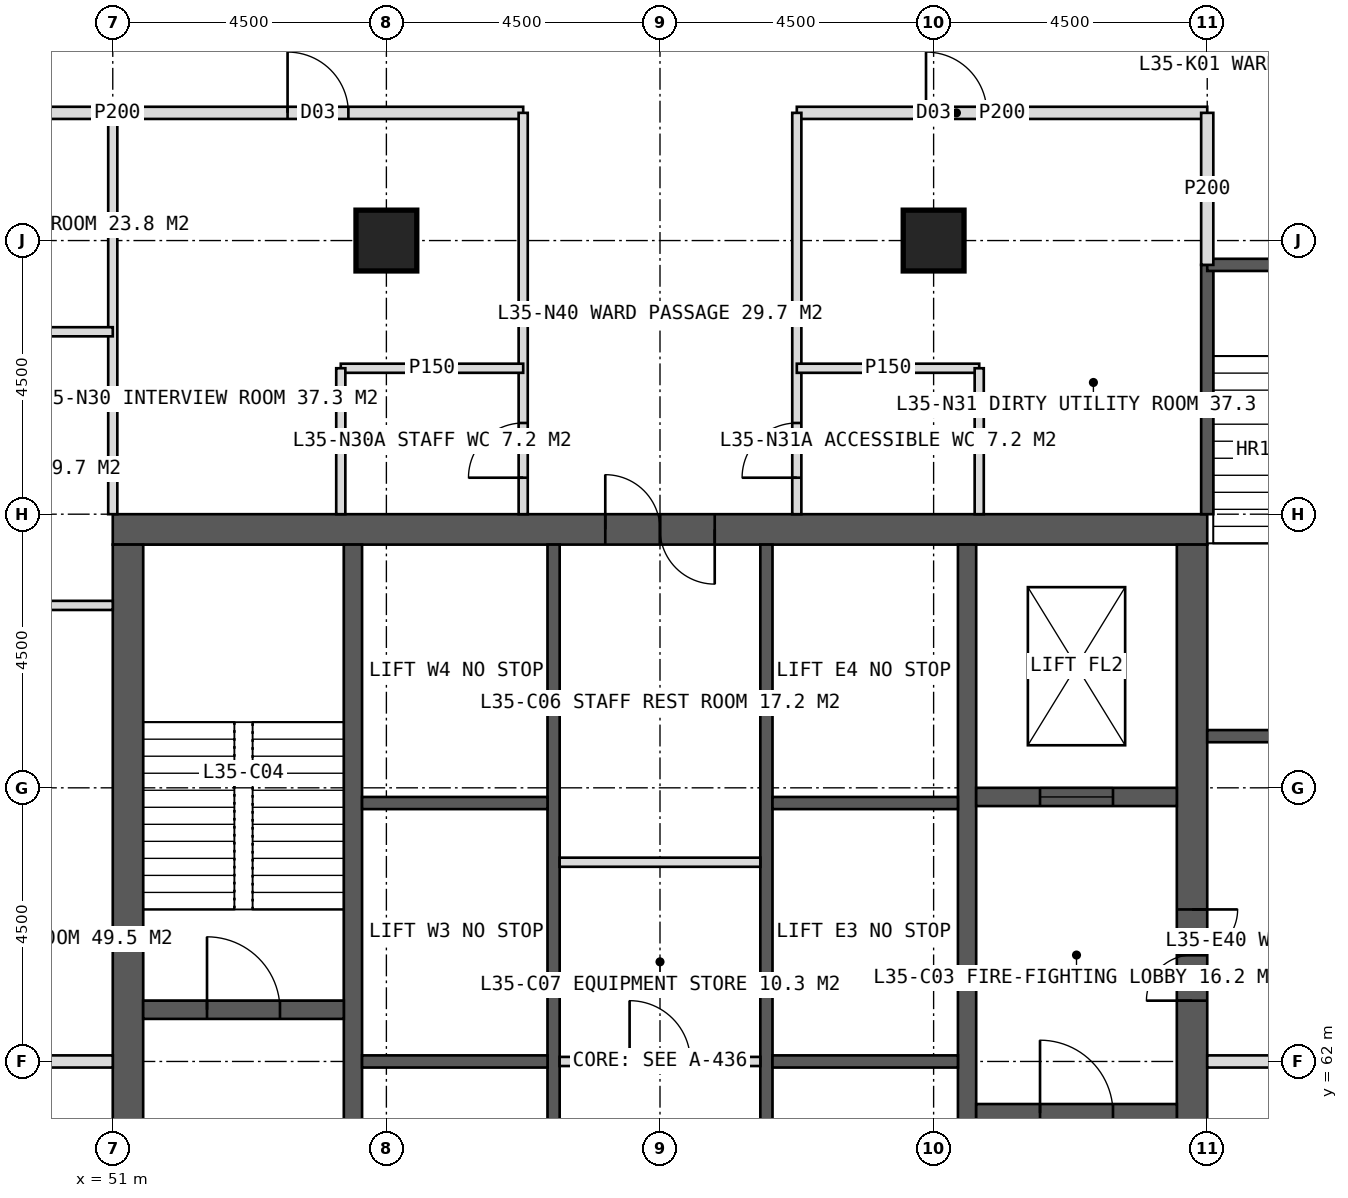
"""IFC4 building model, lengths in metres.
Left out: names, types, materials, properties, quantities, classifications, styles, units other than length and angle.
Written with IfcOpenShell. Run it as: python <this file> out.ifc"""

import sys

from ifc_helpers import new_model, si_unit, direction, frame, frame_2d, origin, origin_2d, place, context, subcontext, project, spatial, rectangle, hollow_rectangle, extrude, element, fill, save


model = new_model("IFC4")
c1 = context("Model", 3, precision=1e-05, world=origin(), true_north=direction((0.0, 1.0)))
c2 = subcontext(c1, "Body", "Model", "MODEL_VIEW")
j1 = project(units=[si_unit("LENGTHUNIT", "METRE"), si_unit("PLANEANGLEUNIT", "RADIAN")], contexts=[c1])
p1 = place(None, origin())
s1 = spatial("IfcSite", under=j1, at=p1, CompositionType="ELEMENT")
p2 = place(p1, origin())
s2 = spatial("IfcBuilding", under=s1, at=p2, CompositionType="ELEMENT")
p3 = place(p2, frame((0.0, 0.0, 148.0)))
s3 = spatial("IfcBuildingStorey", under=s2, at=p3, CompositionType="ELEMENT", Elevation=148.0)
p4 = place(p3, frame((51.0, 70.75, 0.0), z_axis=(0.0, 0.0, 1.0), x_axis=(1.0, 0.0, 0.0)))
e1 = element("IfcWall", 1, at=p4, inside=s3, PredefinedType="SHEAR", context=c2, shape_type="SweptSolid", body=[
    extrude(rectangle(XDim=18.0, YDim=0.5, at=frame_2d((9.0, 0.0))), origin(), (0.0, 0.0, 1.0), 4.0),
])
p5 = place(p4, frame((8.1, 0.0, 0.0)))
e2 = element("IfcOpeningElement", 2, at=p5, cuts=e1, PredefinedType="OPENING", context=c2, shape_type="SweptSolid", body=[
    extrude(rectangle(XDim=1.8, YDim=2.2, at=frame_2d((0.9, 1.1))), frame((0.0, 0.26, 0.0), z_axis=(0.0, -1.0, 0.0), x_axis=(1.0, 0.0, 0.0)), (0.0, 0.0, 1.0), 0.52),
])
p6 = place(p3, frame((51.25, 53.5, 0.0), z_axis=(0.0, 0.0, 1.0), x_axis=(0.0, 1.0, 0.0)))
e3 = element("IfcWall", 3, at=p6, inside=s3, PredefinedType="SHEAR", context=c2, shape_type="SweptSolid", body=[
    extrude(rectangle(XDim=17.0, YDim=0.5, at=frame_2d((8.5, 0.0))), origin(), (0.0, 0.0, 1.0), 4.0),
])
p7 = place(p6, frame((6.0, 0.0, 0.0)))
e4 = element("IfcOpeningElement", 4, at=p7, cuts=e3, PredefinedType="OPENING", context=c2, shape_type="SweptSolid", body=[
    extrude(rectangle(XDim=1.5, YDim=2.2, at=frame_2d((0.75, 1.1))), frame((0.0, 0.26, 0.0), z_axis=(0.0, -1.0, 0.0), x_axis=(1.0, 0.0, 0.0)), (0.0, 0.0, 1.0), 0.52),
])
p8 = place(p3, frame((68.75, 53.5, 0.0), z_axis=(0.0, 0.0, 1.0), x_axis=(0.0, 1.0, 0.0)))
e5 = element("IfcWall", 5, at=p8, inside=s3, PredefinedType="SHEAR", context=c2, shape_type="SweptSolid", body=[
    extrude(rectangle(XDim=17.0, YDim=0.5, at=frame_2d((8.5, 0.0))), origin(), (0.0, 0.0, 1.0), 4.0),
])
p9 = place(p8, frame((9.5, 0.0, 0.0)))
e6 = element("IfcOpeningElement", 6, at=p9, cuts=e5, PredefinedType="OPENING", context=c2, shape_type="SweptSolid", body=[
    extrude(rectangle(XDim=1.5, YDim=2.2, at=frame_2d((0.75, 1.1))), frame((0.0, 0.26, 0.0), z_axis=(0.0, -1.0, 0.0), x_axis=(1.0, 0.0, 0.0)), (0.0, 0.0, 1.0), 0.52),
])
for number, where, z_axis, x_axis in (
    (7, (54.95, 53.5, 0.0), (0.0, 0.0, 1.0), (0.0, 1.0, 0.0)),
    (8, (65.05, 53.5, 0.0), (0.0, 0.0, 1.0), (0.0, 1.0, 0.0)),
):
    element("IfcWall", number, at=place(p3, frame(where, z_axis=z_axis, x_axis=x_axis)), inside=s3, PredefinedType="SHEAR", context=c2, shape_type="SweptSolid", body=[
        extrude(rectangle(XDim=17.0, YDim=0.3, at=frame_2d((8.5, 0.0))), origin(), (0.0, 0.0, 1.0), 4.0),
    ])
p10 = place(p3, frame((58.25, 53.5, 0.0), z_axis=(0.0, 0.0, 1.0), x_axis=(0.0, 1.0, 0.0)))
e9 = element("IfcWall", 9, at=p10, inside=s3, PredefinedType="SHEAR", context=c2, shape_type="SweptSolid", body=[
    extrude(rectangle(XDim=17.0, YDim=0.2, at=frame_2d((8.5, 0.0))), origin(), (0.0, 0.0, 1.0), 4.0),
])
p11 = place(p10, frame((1.375, 0.0, 0.0)))
e10 = element("IfcOpeningElement", 10, at=p11, cuts=e9, PredefinedType="OPENING", context=c2, shape_type="SweptSolid", body=[
    extrude(rectangle(XDim=1.4, YDim=2.2, at=frame_2d((0.7, 1.1))), frame((0.0, 0.11, 0.0), z_axis=(0.0, -1.0, 0.0), x_axis=(1.0, 0.0, 0.0)), (0.0, 0.0, 1.0), 0.22),
])
p12 = place(p10, frame((5.675, 0.0, 0.0)))
e11 = element("IfcOpeningElement", 11, at=p12, cuts=e9, PredefinedType="OPENING", context=c2, shape_type="SweptSolid", body=[
    extrude(rectangle(XDim=1.4, YDim=2.2, at=frame_2d((0.7, 1.1))), frame((0.0, 0.11, 0.0), z_axis=(0.0, -1.0, 0.0), x_axis=(1.0, 0.0, 0.0)), (0.0, 0.0, 1.0), 0.22),
])
p13 = place(p3, frame((61.75, 53.5, 0.0), z_axis=(0.0, 0.0, 1.0), x_axis=(0.0, 1.0, 0.0)))
e12 = element("IfcWall", 12, at=p13, inside=s3, PredefinedType="SHEAR", context=c2, shape_type="SweptSolid", body=[
    extrude(rectangle(XDim=17.0, YDim=0.2, at=frame_2d((8.5, 0.0))), origin(), (0.0, 0.0, 1.0), 4.0),
])
p14 = place(p13, frame((1.375, 0.0, 0.0)))
e13 = element("IfcOpeningElement", 13, at=p14, cuts=e12, PredefinedType="OPENING", context=c2, shape_type="SweptSolid", body=[
    extrude(rectangle(XDim=1.4, YDim=2.2, at=frame_2d((0.7, 1.1))), frame((0.0, 0.11, 0.0), z_axis=(0.0, -1.0, 0.0), x_axis=(1.0, 0.0, 0.0)), (0.0, 0.0, 1.0), 0.22),
])
p15 = place(p13, frame((5.675, 0.0, 0.0)))
e14 = element("IfcOpeningElement", 14, at=p15, cuts=e12, PredefinedType="OPENING", context=c2, shape_type="SweptSolid", body=[
    extrude(rectangle(XDim=1.4, YDim=2.2, at=frame_2d((0.7, 1.1))), frame((0.0, 0.11, 0.0), z_axis=(0.0, -1.0, 0.0), x_axis=(1.0, 0.0, 0.0)), (0.0, 0.0, 1.0), 0.22),
])
for number, where, z_axis, x_axis in (
    (15, (55.1, 62.0, 0.0), (0.0, 0.0, 1.0), (1.0, 0.0, 0.0)),
    (16, (61.85, 62.0, 0.0), (0.0, 0.0, 1.0), (1.0, 0.0, 0.0)),
    (17, (55.1, 66.25, 0.0), (0.0, 0.0, 1.0), (1.0, 0.0, 0.0)),
    (18, (61.85, 66.25, 0.0), (0.0, 0.0, 1.0), (1.0, 0.0, 0.0)),
):
    element("IfcWall", number, at=place(p3, frame(where, z_axis=z_axis, x_axis=x_axis)), inside=s3, PredefinedType="SHEAR", context=c2, shape_type="SweptSolid", body=[
        extrude(rectangle(XDim=3.05, YDim=0.2, at=frame_2d((1.525, 0.0))), origin(), (0.0, 0.0, 1.0), 4.0),
    ])
p16 = place(p3, frame((51.5, 62.85, 0.0), z_axis=(0.0, 0.0, 1.0), x_axis=(1.0, 0.0, 0.0)))
e19 = element("IfcWall", 19, at=p16, inside=s3, PredefinedType="SHEAR", context=c2, shape_type="SweptSolid", body=[
    extrude(rectangle(XDim=3.3, YDim=0.3, at=frame_2d((1.65, 0.0))), origin(), (0.0, 0.0, 1.0), 4.0),
])
p17 = place(p16, frame((1.05, 0.0, 0.0)))
e20 = element("IfcOpeningElement", 20, at=p17, cuts=e19, PredefinedType="OPENING", context=c2, shape_type="SweptSolid", body=[
    extrude(rectangle(XDim=1.2, YDim=2.1, at=frame_2d((0.6, 1.05))), frame((0.0, 0.16, 0.0), z_axis=(0.0, -1.0, 0.0), x_axis=(1.0, 0.0, 0.0)), (0.0, 0.0, 1.0), 0.32),
])
p18 = place(p3, frame((65.2, 61.15, 0.0), z_axis=(0.0, 0.0, 1.0), x_axis=(1.0, 0.0, 0.0)))
e21 = element("IfcWall", 21, at=p18, inside=s3, PredefinedType="SHEAR", context=c2, shape_type="SweptSolid", body=[
    extrude(rectangle(XDim=3.3, YDim=0.3, at=frame_2d((1.65, 0.0))), origin(), (0.0, 0.0, 1.0), 4.0),
])
p19 = place(p18, frame((1.05, 0.0, 0.0)))
e22 = element("IfcOpeningElement", 22, at=p19, cuts=e21, PredefinedType="OPENING", context=c2, shape_type="SweptSolid", body=[
    extrude(rectangle(XDim=1.2, YDim=2.1, at=frame_2d((0.6, 1.05))), frame((0.0, 0.16, 0.0), z_axis=(0.0, -1.0, 0.0), x_axis=(1.0, 0.0, 0.0)), (0.0, 0.0, 1.0), 0.32),
])
p20 = place(p3, frame((65.2, 66.35, 0.0), z_axis=(0.0, 0.0, 1.0), x_axis=(1.0, 0.0, 0.0)))
e23 = element("IfcWall", 23, at=p20, inside=s3, PredefinedType="SHEAR", context=c2, shape_type="SweptSolid", body=[
    extrude(rectangle(XDim=3.3, YDim=0.3, at=frame_2d((1.65, 0.0))), origin(), (0.0, 0.0, 1.0), 4.0),
])
p21 = place(p20, frame((1.05, 0.0, 0.0)))
e24 = element("IfcOpeningElement", 24, at=p21, cuts=e23, PredefinedType="OPENING", context=c2, shape_type="SweptSolid", body=[
    extrude(rectangle(XDim=1.2, YDim=2.2, at=frame_2d((0.6, 1.1))), frame((0.0, 0.16, 0.0), z_axis=(0.0, -1.0, 0.0), x_axis=(1.0, 0.0, 0.0)), (0.0, 0.0, 1.0), 0.32),
])
for number, where, z_axis, x_axis in (
    (25, (55.5, 75.5, 0.0), (0.0, 0.0, 1.0), (1.0, 0.0, 0.0)),
    (26, (64.5, 75.5, 0.0), (0.0, 0.0, 1.0), (1.0, 0.0, 0.0)),
):
    element("IfcColumn", number, at=place(p3, frame(where, z_axis=z_axis, x_axis=x_axis)), inside=s3, PredefinedType="COLUMN", context=c2, shape_type="SweptSolid", body=[
        extrude(hollow_rectangle(XDim=1.0, YDim=1.0, WallThickness=0.1, at=origin_2d()), origin(), (0.0, 0.0, 1.0), 4.0),
    ])
p22 = place(p3, frame((51.0, 71.0, 0.0), z_axis=(0.0, 0.0, 1.0), x_axis=(0.0, 1.0, 0.0)))
e27 = element("IfcWall", 27, at=p22, inside=s3, PredefinedType="PARTITIONING", context=c2, shape_type="SweptSolid", body=[
    extrude(rectangle(XDim=6.6, YDim=0.15, at=frame_2d((3.3, 0.0))), origin(), (0.0, 0.0, 1.0), 3.75),
])
p23 = place(p3, frame((44.4, 77.6, 0.0), z_axis=(0.0, 0.0, 1.0), x_axis=(1.0, 0.0, 0.0)))
e28 = element("IfcWall", 28, at=p23, inside=s3, PredefinedType="PARTITIONING", context=c2, shape_type="SweptSolid", body=[
    extrude(rectangle(XDim=13.35, YDim=0.2, at=frame_2d((6.675, 0.0))), origin(), (0.0, 0.0, 1.0), 3.75),
])
p24 = place(p23, frame((9.475, 0.0, 0.0)))
e29 = element("IfcOpeningElement", 29, at=p24, cuts=e28, PredefinedType="OPENING", context=c2, shape_type="SweptSolid", body=[
    extrude(rectangle(XDim=1.0, YDim=2.1, at=frame_2d((0.5, 1.05))), frame((0.0, 0.11, 0.0), z_axis=(0.0, -1.0, 0.0), x_axis=(1.0, 0.0, 0.0)), (0.0, 0.0, 1.0), 0.22),
])
p25 = place(p3, frame((62.25, 77.6, 0.0), z_axis=(0.0, 0.0, 1.0), x_axis=(1.0, 0.0, 0.0)))
e30 = element("IfcWall", 30, at=p25, inside=s3, PredefinedType="PARTITIONING", context=c2, shape_type="SweptSolid", body=[
    extrude(rectangle(XDim=6.75, YDim=0.2, at=frame_2d((3.375, 0.0))), origin(), (0.0, 0.0, 1.0), 3.75),
])
p26 = place(p25, frame((2.125, 0.0, 0.0)))
e31 = element("IfcOpeningElement", 31, at=p26, cuts=e30, PredefinedType="OPENING", context=c2, shape_type="SweptSolid", body=[
    extrude(rectangle(XDim=1.0, YDim=2.1, at=frame_2d((0.5, 1.05))), frame((0.0, 0.11, 0.0), z_axis=(0.0, -1.0, 0.0), x_axis=(1.0, 0.0, 0.0)), (0.0, 0.0, 1.0), 0.22),
])
p27 = place(p3, frame((57.75, 71.0, 0.0), z_axis=(0.0, 0.0, 1.0), x_axis=(0.0, 1.0, 0.0)))
e32 = element("IfcWall", 32, at=p27, inside=s3, PredefinedType="PARTITIONING", context=c2, shape_type="SweptSolid", body=[
    extrude(rectangle(XDim=6.6, YDim=0.15, at=frame_2d((3.3, 0.0))), origin(), (0.0, 0.0, 1.0), 3.75),
])
p28 = place(p27, frame((0.6, 0.0, 0.0)))
e33 = element("IfcOpeningElement", 33, at=p28, cuts=e32, PredefinedType="OPENING", context=c2, shape_type="SweptSolid", body=[
    extrude(rectangle(XDim=0.9, YDim=2.1, at=frame_2d((0.45, 1.05))), frame((0.0, 0.085, 0.0), z_axis=(0.0, -1.0, 0.0), x_axis=(1.0, 0.0, 0.0)), (0.0, 0.0, 1.0), 0.17),
])
p29 = place(p3, frame((62.25, 71.0, 0.0), z_axis=(0.0, 0.0, 1.0), x_axis=(0.0, 1.0, 0.0)))
e34 = element("IfcWall", 34, at=p29, inside=s3, PredefinedType="PARTITIONING", context=c2, shape_type="SweptSolid", body=[
    extrude(rectangle(XDim=6.6, YDim=0.15, at=frame_2d((3.3, 0.0))), origin(), (0.0, 0.0, 1.0), 3.75),
])
p30 = place(p29, frame((0.6, 0.0, 0.0)))
e35 = element("IfcOpeningElement", 35, at=p30, cuts=e34, PredefinedType="OPENING", context=c2, shape_type="SweptSolid", body=[
    extrude(rectangle(XDim=0.9, YDim=2.1, at=frame_2d((0.45, 1.05))), frame((0.0, 0.085, 0.0), z_axis=(0.0, -1.0, 0.0), x_axis=(1.0, 0.0, 0.0)), (0.0, 0.0, 1.0), 0.17),
])
p31 = place(p3, frame((54.75, 73.4, 0.0), z_axis=(0.0, 0.0, 1.0), x_axis=(1.0, 0.0, 0.0)))
e36 = element("IfcWall", 36, at=p31, inside=s3, PredefinedType="PARTITIONING", context=c2, shape_type="SweptSolid", body=[
    extrude(rectangle(XDim=3.0, YDim=0.15, at=frame_2d((1.5, 0.0))), origin(), (0.0, 0.0, 1.0), 3.75),
])
p32 = place(p3, frame((54.75, 71.0, 0.0), z_axis=(0.0, 0.0, 1.0), x_axis=(0.0, 1.0, 0.0)))
e37 = element("IfcWall", 37, at=p32, inside=s3, PredefinedType="PARTITIONING", context=c2, shape_type="SweptSolid", body=[
    extrude(rectangle(XDim=2.4, YDim=0.15, at=frame_2d((1.2, 0.0))), origin(), (0.0, 0.0, 1.0), 3.75),
])
p33 = place(p3, frame((62.25, 73.4, 0.0), z_axis=(0.0, 0.0, 1.0), x_axis=(1.0, 0.0, 0.0)))
e38 = element("IfcWall", 38, at=p33, inside=s3, PredefinedType="PARTITIONING", context=c2, shape_type="SweptSolid", body=[
    extrude(rectangle(XDim=3.0, YDim=0.15, at=frame_2d((1.5, 0.0))), origin(), (0.0, 0.0, 1.0), 3.75),
])
p34 = place(p3, frame((65.25, 71.0, 0.0), z_axis=(0.0, 0.0, 1.0), x_axis=(0.0, 1.0, 0.0)))
e39 = element("IfcWall", 39, at=p34, inside=s3, PredefinedType="PARTITIONING", context=c2, shape_type="SweptSolid", body=[
    extrude(rectangle(XDim=2.4, YDim=0.15, at=frame_2d((1.2, 0.0))), origin(), (0.0, 0.0, 1.0), 3.75),
])
p35 = place(p3, frame((51.0, 62.0, 0.0), z_axis=(0.0, 0.0, 1.0), x_axis=(-1.0, 0.0, 0.0)))
e40 = element("IfcWall", 40, at=p35, inside=s3, PredefinedType="SOLIDWALL", context=c2, shape_type="SweptSolid", body=[
    extrude(rectangle(XDim=6.6, YDim=0.2, at=frame_2d((3.3, 0.0))), origin(), (0.0, 0.0, 1.0), 2.95),
])
for number, where, z_axis, x_axis in (
    (41, (51.0, 69.5, 0.0), (0.0, 0.0, 1.0), (-1.0, 0.0, 0.0)),
    (42, (51.0, 74.0, 0.0), (0.0, 0.0, 1.0), (-1.0, 0.0, 0.0)),
):
    element("IfcWall", number, at=place(p3, frame(where, z_axis=z_axis, x_axis=x_axis)), inside=s3, PredefinedType="PARTITIONING", context=c2, shape_type="SweptSolid", body=[
        extrude(rectangle(XDim=6.6, YDim=0.15, at=frame_2d((3.3, 0.0))), origin(), (0.0, 0.0, 1.0), 3.75),
    ])
p36 = place(p3, frame((69.0, 62.0, 0.0), z_axis=(0.0, 0.0, 1.0), x_axis=(1.0, 0.0, 0.0)))
e43 = element("IfcWall", 43, at=p36, inside=s3, PredefinedType="SOLIDWALL", context=c2, shape_type="SweptSolid", body=[
    extrude(rectangle(XDim=6.6, YDim=0.2, at=frame_2d((3.3, 0.0))), origin(), (0.0, 0.0, 1.0), 2.95),
])
p37 = place(p3, frame((58.35, 62.0, 0.0), z_axis=(0.0, 0.0, 1.0), x_axis=(1.0, 0.0, 0.0)))
e44 = element("IfcWall", 44, at=p37, inside=s3, PredefinedType="PARTITIONING", context=c2, shape_type="SweptSolid", body=[
    extrude(rectangle(XDim=3.3, YDim=0.15, at=frame_2d((1.65, 0.0))), origin(), (0.0, 0.0, 1.0), 3.75),
])
p38 = place(p37, frame((1.15, 0.0, 0.0)))
e45 = element("IfcOpeningElement", 45, at=p38, cuts=e44, PredefinedType="OPENING", context=c2, shape_type="SweptSolid", body=[
    extrude(rectangle(XDim=1.0, YDim=2.1, at=frame_2d((0.5, 1.05))), frame((0.0, 0.085, 0.0), z_axis=(0.0, -1.0, 0.0), x_axis=(1.0, 0.0, 0.0)), (0.0, 0.0, 1.0), 0.17),
])
p39 = place(p3, frame((58.35, 65.277, 0.0), z_axis=(0.0, 0.0, 1.0), x_axis=(1.0, 0.0, 0.0)))
e46 = element("IfcWall", 46, at=p39, inside=s3, PredefinedType="PARTITIONING", context=c2, shape_type="SweptSolid", body=[
    extrude(rectangle(XDim=3.3, YDim=0.15, at=frame_2d((1.65, 0.0))), origin(), (0.0, 0.0, 1.0), 3.75),
])
p40 = place(p3, frame((69.0, 71.0, 0.0), z_axis=(0.0, 0.0, 1.0), x_axis=(0.0, 1.0, 0.0)))
e47 = element("IfcWall", 47, at=p40, inside=s3, PredefinedType="SOLIDWALL", context=c2, shape_type="SweptSolid", body=[
    extrude(rectangle(XDim=4.1, YDim=0.2, at=frame_2d((2.05, 0.0))), origin(), (0.0, 0.0, 1.0), 3.75),
])
p41 = place(p3, frame((69.0, 67.35, 0.0), z_axis=(0.0, 0.0, 1.0), x_axis=(1.0, 0.0, 0.0)))
e48 = element("IfcWall", 48, at=p41, inside=s3, PredefinedType="SOLIDWALL", context=c2, shape_type="SweptSolid", body=[
    extrude(rectangle(XDim=3.5, YDim=0.2, at=frame_2d((1.75, 0.0))), origin(), (0.0, 0.0, 1.0), 3.75),
])
p42 = place(p3, frame((69.0, 75.1, 0.0), z_axis=(0.0, 0.0, 1.0), x_axis=(1.0, 0.0, 0.0)))
e49 = element("IfcWall", 49, at=p42, inside=s3, PredefinedType="SOLIDWALL", context=c2, shape_type="SweptSolid", body=[
    extrude(rectangle(XDim=3.5, YDim=0.2, at=frame_2d((1.75, 0.0))), origin(), (0.0, 0.0, 1.0), 3.75),
])
p43 = place(p42, frame((1.15, 0.0, 0.0)))
e50 = element("IfcOpeningElement", 50, at=p43, cuts=e49, PredefinedType="OPENING", context=c2, shape_type="SweptSolid", body=[
    extrude(rectangle(XDim=1.2, YDim=2.1, at=frame_2d((0.6, 1.05))), frame((0.0, 0.11, 0.0), z_axis=(0.0, -1.0, 0.0), x_axis=(1.0, 0.0, 0.0)), (0.0, 0.0, 1.0), 0.22),
])
p44 = place(p3, frame((69.0, 75.1, 0.0), z_axis=(0.0, 0.0, 1.0), x_axis=(0.0, 1.0, 0.0)))
e51 = element("IfcWall", 51, at=p44, inside=s3, PredefinedType="PARTITIONING", context=c2, shape_type="SweptSolid", body=[
    extrude(rectangle(XDim=2.5, YDim=0.2, at=frame_2d((1.25, 0.0))), origin(), (0.0, 0.0, 1.0), 3.75),
])
p45 = place(p28, origin())
e52 = element("IfcDoor", 52, at=p45, inside=s3, OperationType="SINGLE_SWING_LEFT", PredefinedType="DOOR", context=c2, shape_type="SweptSolid", body=[
    extrude(rectangle(XDim=0.9, YDim=2.1, at=frame_2d((0.45, 1.05))), frame((0.0, 0.025, 0.0), z_axis=(0.0, -1.0, 0.0), x_axis=(1.0, 0.0, 0.0)), (0.0, 0.0, 1.0), 0.05),
])
fill(e33, e52)
p46 = place(p24, origin())
e53 = element("IfcDoor", 53, at=p46, inside=s3, OperationType="SINGLE_SWING_LEFT", PredefinedType="DOOR", context=c2, shape_type="SweptSolid", body=[
    extrude(rectangle(XDim=1.0, YDim=2.1, at=frame_2d((0.5, 1.05))), frame((0.0, 0.025, 0.0), z_axis=(0.0, -1.0, 0.0), x_axis=(1.0, 0.0, 0.0)), (0.0, 0.0, 1.0), 0.05),
])
fill(e29, e53)
p47 = place(p30, origin())
e54 = element("IfcDoor", 54, at=p47, inside=s3, OperationType="SINGLE_SWING_LEFT", PredefinedType="DOOR", context=c2, shape_type="SweptSolid", body=[
    extrude(rectangle(XDim=0.9, YDim=2.1, at=frame_2d((0.45, 1.05))), frame((0.0, 0.025, 0.0), z_axis=(0.0, -1.0, 0.0), x_axis=(1.0, 0.0, 0.0)), (0.0, 0.0, 1.0), 0.05),
])
fill(e35, e54)
p48 = place(p26, origin())
e55 = element("IfcDoor", 55, at=p48, inside=s3, OperationType="SINGLE_SWING_LEFT", PredefinedType="DOOR", context=c2, shape_type="SweptSolid", body=[
    extrude(rectangle(XDim=1.0, YDim=2.1, at=frame_2d((0.5, 1.05))), frame((0.0, 0.025, 0.0), z_axis=(0.0, -1.0, 0.0), x_axis=(1.0, 0.0, 0.0)), (0.0, 0.0, 1.0), 0.05),
])
fill(e31, e55)
p49 = place(p9, origin())
e56 = element("IfcDoor", 56, at=p49, inside=s3, OperationType="DOUBLE_DOOR_SINGLE_SWING", PredefinedType="DOOR", context=c2, shape_type="SweptSolid", body=[
    extrude(rectangle(XDim=1.5, YDim=2.2, at=frame_2d((0.75, 1.1))), frame((0.0, 0.025, 0.0), z_axis=(0.0, -1.0, 0.0), x_axis=(1.0, 0.0, 0.0)), (0.0, 0.0, 1.0), 0.05),
])
fill(e6, e56)
p50 = place(p17, origin())
e57 = element("IfcDoor", 57, at=p50, inside=s3, OperationType="SINGLE_SWING_LEFT", PredefinedType="DOOR", context=c2, shape_type="SweptSolid", body=[
    extrude(rectangle(XDim=1.2, YDim=2.1, at=frame_2d((0.6, 1.05))), frame((0.0, 0.025, 0.0), z_axis=(0.0, -1.0, 0.0), x_axis=(1.0, 0.0, 0.0)), (0.0, 0.0, 1.0), 0.05),
])
fill(e20, e57)
p51 = place(p19, origin())
e58 = element("IfcDoor", 58, at=p51, inside=s3, OperationType="SINGLE_SWING_LEFT", PredefinedType="DOOR", context=c2, shape_type="SweptSolid", body=[
    extrude(rectangle(XDim=1.2, YDim=2.1, at=frame_2d((0.6, 1.05))), frame((0.0, 0.025, 0.0), z_axis=(0.0, -1.0, 0.0), x_axis=(1.0, 0.0, 0.0)), (0.0, 0.0, 1.0), 0.05),
])
fill(e22, e58)
p52 = place(p21, origin())
e59 = element("IfcDoor", 59, at=p52, inside=s3, OperationType="SLIDING_TO_LEFT", PredefinedType="DOOR", context=c2, shape_type="SweptSolid", body=[
    extrude(rectangle(XDim=1.2, YDim=2.2, at=frame_2d((0.6, 1.1))), frame((0.0, 0.025, 0.0), z_axis=(0.0, -1.0, 0.0), x_axis=(1.0, 0.0, 0.0)), (0.0, 0.0, 1.0), 0.05),
])
fill(e24, e59)
p53 = place(p38, origin())
e60 = element("IfcDoor", 60, at=p53, inside=s3, OperationType="SINGLE_SWING_LEFT", PredefinedType="DOOR", context=c2, shape_type="SweptSolid", body=[
    extrude(rectangle(XDim=1.0, YDim=2.1, at=frame_2d((0.5, 1.05))), frame((0.0, 0.025, 0.0), z_axis=(0.0, -1.0, 0.0), x_axis=(1.0, 0.0, 0.0)), (0.0, 0.0, 1.0), 0.05),
])
fill(e45, e60)
p54 = place(p5, origin())
e61 = element("IfcDoor", 61, at=p54, inside=s3, OperationType="DOUBLE_DOOR_SINGLE_SWING", PredefinedType="DOOR", context=c2, shape_type="SweptSolid", body=[
    extrude(rectangle(XDim=1.8, YDim=2.2, at=frame_2d((0.9, 1.1))), frame((0.0, 0.025, 0.0), z_axis=(0.0, -1.0, 0.0), x_axis=(1.0, 0.0, 0.0)), (0.0, 0.0, 1.0), 0.05),
])
fill(e2, e61)
save(model, sys.argv[1])
